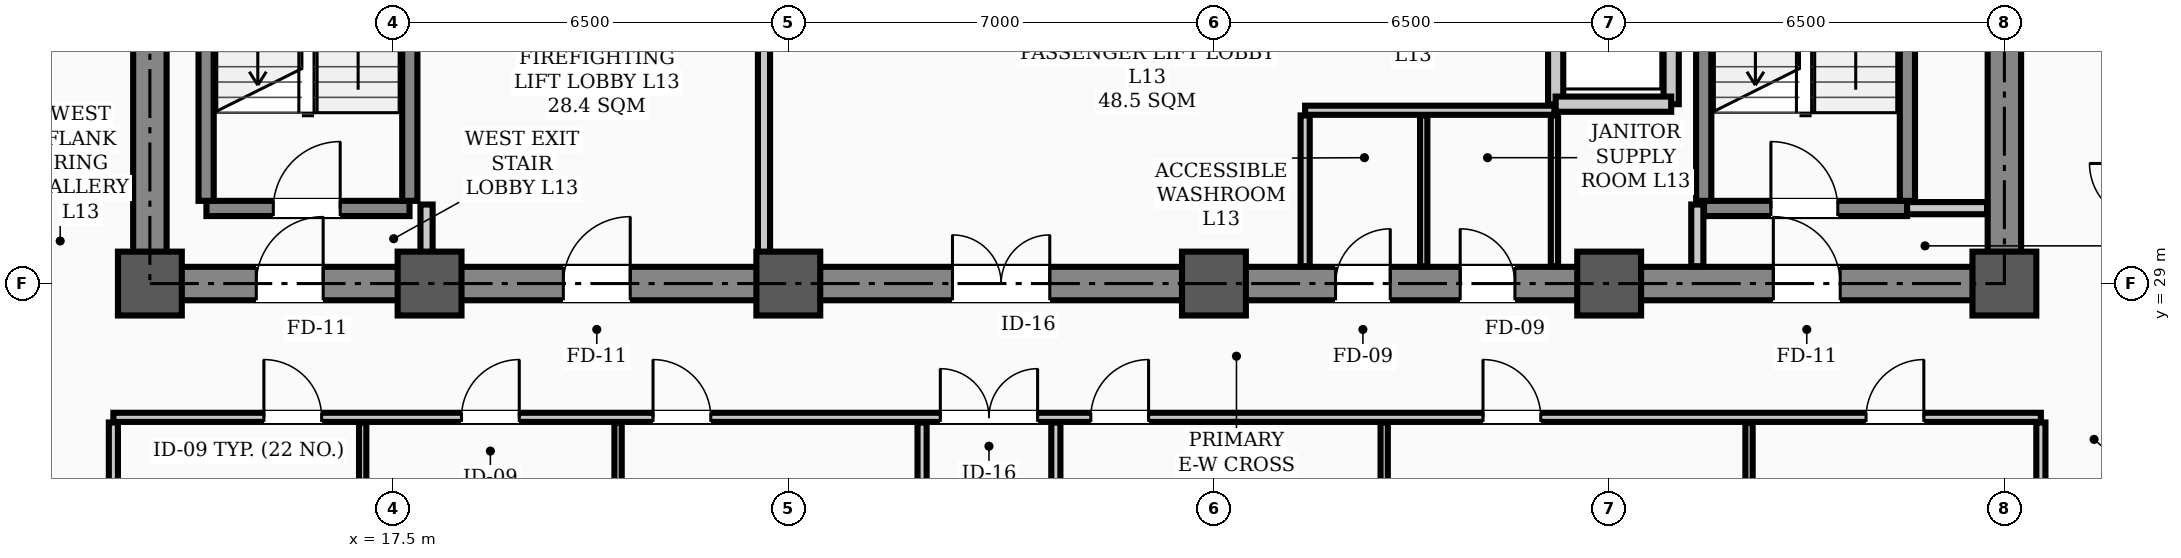
"""IFC4 building model, lengths in metres.
Left out: names, types, materials, properties, quantities, classifications, styles, units other than length and angle.
Written with IfcOpenShell. Run it as: python <this file> out.ifc"""

import sys

from ifc_helpers import new_model, si_unit, direction, frame, frame_2d, origin, origin_2d, place, context, subcontext, project, spatial, rectangle, hollow_rectangle, extrude, element, fill, save


model = new_model("IFC4")
c1 = context("Model", 3, precision=1e-05, world=origin(), true_north=direction((0.0, 1.0)))
c2 = subcontext(c1, "Body", "Model", "MODEL_VIEW")
j1 = project(units=[si_unit("LENGTHUNIT", "METRE"), si_unit("PLANEANGLEUNIT", "RADIAN")], contexts=[c1])
p1 = place(None, origin())
s1 = spatial("IfcSite", under=j1, at=p1, CompositionType="ELEMENT")
p2 = place(p1, origin())
s2 = spatial("IfcBuilding", under=s1, at=p2, CompositionType="ELEMENT")
p3 = place(p2, frame((0.0, 0.0, 53.8)))
s3 = spatial("IfcBuildingStorey", under=s2, at=p3, CompositionType="ELEMENT", Elevation=53.8)
for number, where, z_axis, x_axis in (
    (1, (13.5, 29.0, 0.0), (0.0, 0.0, 1.0), (1.0, 0.0, 0.0)),
    (2, (18.1, 29.0, 0.0), (0.0, 0.0, 1.0), (1.0, 0.0, 0.0)),
    (3, (24.0, 29.0, 0.0), (0.0, 0.0, 1.0), (1.0, 0.0, 0.0)),
    (4, (31.0, 29.0, 0.0), (0.0, 0.0, 1.0), (1.0, 0.0, 0.0)),
    (5, (37.5, 29.0, 0.0), (0.0, 0.0, 1.0), (1.0, 0.0, 0.0)),
    (6, (44.0, 29.0, 0.0), (0.0, 0.0, 1.0), (1.0, 0.0, 0.0)),
):
    element("IfcColumn", number, at=place(p3, frame(where, z_axis=z_axis, x_axis=x_axis)), inside=s3, PredefinedType="COLUMN", context=c2, shape_type="SweptSolid", body=[
        extrude(hollow_rectangle(XDim=1.05, YDim=1.05, WallThickness=0.038, InnerFilletRadius=0.019, OuterFilletRadius=0.057, at=origin_2d()), origin(), (0.0, 0.0, 1.0), 3.9),
    ])
p4 = place(p3, frame((13.5, 29.0, 0.0), z_axis=(0.0, 0.0, 1.0), x_axis=(1.0, 0.0, 0.0)))
e7 = element("IfcWall", 7, at=p4, inside=s3, PredefinedType="SHEAR", context=c2, shape_type="SweptSolid", body=[
    extrude(rectangle(XDim=30.5, YDim=0.55, at=frame_2d((15.25, 0.0))), origin(), (0.0, 0.0, 1.0), 3.72),
])
p5 = place(p4, frame((1.75, 0.0, 0.0)))
e8 = element("IfcOpeningElement", 8, at=p5, cuts=e7, PredefinedType="OPENING", context=c2, shape_type="SweptSolid", body=[
    extrude(rectangle(XDim=1.1, YDim=2.08, at=frame_2d((0.55, 1.04))), frame((0.0, 0.285, 0.0), z_axis=(0.0, -1.0, 0.0), x_axis=(1.0, 0.0, 0.0)), (0.0, 0.0, 1.0), 0.57),
])
p6 = place(p4, frame((26.7, 0.0, 0.0)))
e9 = element("IfcOpeningElement", 9, at=p6, cuts=e7, PredefinedType="OPENING", context=c2, shape_type="SweptSolid", body=[
    extrude(rectangle(XDim=1.1, YDim=2.08, at=frame_2d((0.55, 1.04))), frame((0.0, 0.285, 0.0), z_axis=(0.0, -1.0, 0.0), x_axis=(1.0, 0.0, 0.0)), (0.0, 0.0, 1.0), 0.57),
])
p7 = place(p4, frame((6.8, 0.0, 0.0)))
e10 = element("IfcOpeningElement", 10, at=p7, cuts=e7, PredefinedType="OPENING", context=c2, shape_type="SweptSolid", body=[
    extrude(rectangle(XDim=1.1, YDim=2.08, at=frame_2d((0.55, 1.04))), frame((0.0, 0.285, 0.0), z_axis=(0.0, -1.0, 0.0), x_axis=(1.0, 0.0, 0.0)), (0.0, 0.0, 1.0), 0.57),
])
p8 = place(p4, frame((13.2, 0.0, 0.0)))
e11 = element("IfcOpeningElement", 11, at=p8, cuts=e7, PredefinedType="OPENING", context=c2, shape_type="SweptSolid", body=[
    extrude(rectangle(XDim=1.6, YDim=2.08, at=frame_2d((0.8, 1.04))), frame((0.0, 0.285, 0.0), z_axis=(0.0, -1.0, 0.0), x_axis=(1.0, 0.0, 0.0)), (0.0, 0.0, 1.0), 0.57),
])
p9 = place(p4, frame((19.5, 0.0, 0.0)))
e12 = element("IfcOpeningElement", 12, at=p9, cuts=e7, PredefinedType="OPENING", context=c2, shape_type="SweptSolid", body=[
    extrude(rectangle(XDim=0.9, YDim=2.08, at=frame_2d((0.45, 1.04))), frame((0.0, 0.285, 0.0), z_axis=(0.0, -1.0, 0.0), x_axis=(1.0, 0.0, 0.0)), (0.0, 0.0, 1.0), 0.57),
])
p10 = place(p4, frame((21.55, 0.0, 0.0)))
e13 = element("IfcOpeningElement", 13, at=p10, cuts=e7, PredefinedType="OPENING", context=c2, shape_type="SweptSolid", body=[
    extrude(rectangle(XDim=0.9, YDim=2.08, at=frame_2d((0.45, 1.04))), frame((0.0, 0.285, 0.0), z_axis=(0.0, -1.0, 0.0), x_axis=(1.0, 0.0, 0.0)), (0.0, 0.0, 1.0), 0.57),
])
for number, where, z_axis, x_axis in (
    (14, (13.5, 29.35, 0.0), (0.0, 0.0, 1.0), (0.0, 1.0, 0.0)),
    (15, (44.0, 29.35, 0.0), (0.0, 0.0, 1.0), (0.0, 1.0, 0.0)),
):
    element("IfcWall", number, at=place(p3, frame(where, z_axis=z_axis, x_axis=x_axis)), inside=s3, PredefinedType="SHEAR", context=c2, shape_type="SweptSolid", body=[
        extrude(rectangle(XDim=8.6, YDim=0.55, at=frame_2d((4.3, 0.0))), origin(), (0.0, 0.0, 1.0), 3.72),
    ])
p11 = place(p3, frame((14.43, 30.235, 0.0), z_axis=(0.0, 0.0, 1.0), x_axis=(1.0, 0.0, 0.0)))
e16 = element("IfcWall", 16, at=p11, inside=s3, PredefinedType="STANDARD", context=c2, shape_type="SweptSolid", body=[
    extrude(rectangle(XDim=3.34, YDim=0.25, at=frame_2d((1.67, 0.0))), origin(), (0.0, 0.0, 1.0), 3.72),
])
p12 = place(p11, frame((1.1, 0.0, 0.0)))
e17 = element("IfcOpeningElement", 17, at=p12, cuts=e16, PredefinedType="OPENING", context=c2, shape_type="SweptSolid", body=[
    extrude(rectangle(XDim=1.1, YDim=2.08, at=frame_2d((0.55, 1.04))), frame((0.0, 0.135, 0.0), z_axis=(0.0, -1.0, 0.0), x_axis=(1.0, 0.0, 0.0)), (0.0, 0.0, 1.0), 0.27),
])
for number, where, z_axis, x_axis in (
    (18, (14.425, 30.36, 0.0), (0.0, 0.0, 1.0), (0.0, 1.0, 0.0)),
    (19, (17.775, 30.36, 0.0), (0.0, 0.0, 1.0), (0.0, 1.0, 0.0)),
):
    element("IfcWall", number, at=place(p3, frame(where, z_axis=z_axis, x_axis=x_axis)), inside=s3, PredefinedType="STANDARD", context=c2, shape_type="SweptSolid", body=[
        extrude(rectangle(XDim=7.184, YDim=0.25, at=frame_2d((3.592, 0.0))), origin(), (0.0, 0.0, 1.0), 3.72),
    ])
p13 = place(p3, frame((39.06, 30.235, 0.0), z_axis=(0.0, 0.0, 1.0), x_axis=(1.0, 0.0, 0.0)))
e20 = element("IfcWall", 20, at=p13, inside=s3, PredefinedType="STANDARD", context=c2, shape_type="SweptSolid", body=[
    extrude(rectangle(XDim=3.34, YDim=0.25, at=frame_2d((1.67, 0.0))), origin(), (0.0, 0.0, 1.0), 3.72),
])
p14 = place(p13, frame((1.1, 0.0, 0.0)))
e21 = element("IfcOpeningElement", 21, at=p14, cuts=e20, PredefinedType="OPENING", context=c2, shape_type="SweptSolid", body=[
    extrude(rectangle(XDim=1.1, YDim=2.08, at=frame_2d((0.55, 1.04))), frame((0.0, 0.135, 0.0), z_axis=(0.0, -1.0, 0.0), x_axis=(1.0, 0.0, 0.0)), (0.0, 0.0, 1.0), 0.27),
])
for number, where, z_axis, x_axis in (
    (22, (39.055, 30.36, 0.0), (0.0, 0.0, 1.0), (0.0, 1.0, 0.0)),
    (23, (42.405, 30.36, 0.0), (0.0, 0.0, 1.0), (0.0, 1.0, 0.0)),
):
    element("IfcWall", number, at=place(p3, frame(where, z_axis=z_axis, x_axis=x_axis)), inside=s3, PredefinedType="STANDARD", context=c2, shape_type="SweptSolid", body=[
        extrude(rectangle(XDim=7.184, YDim=0.25, at=frame_2d((3.592, 0.0))), origin(), (0.0, 0.0, 1.0), 3.72),
    ])
p15 = place(p3, frame((36.62, 31.95, 0.0), z_axis=(0.0, 0.0, 1.0), x_axis=(0.0, 1.0, 0.0)))
e24 = element("IfcWall", 24, at=p15, inside=s3, PredefinedType="STANDARD", context=c2, shape_type="SweptSolid", body=[
    extrude(rectangle(XDim=6.0, YDim=0.25, at=frame_2d((3.0, 0.0))), origin(), (0.0, 0.0, 1.0), 3.3),
])
p16 = place(p15, frame((0.9, 0.0, 0.0)))
e25 = element("IfcOpeningElement", 25, at=p16, cuts=e24, PredefinedType="OPENING", context=c2, shape_type="SweptSolid", body=[
    extrude(rectangle(XDim=1.1, YDim=2.08, at=frame_2d((0.55, 1.04))), frame((0.0, 0.135, 0.0), z_axis=(0.0, -1.0, 0.0), x_axis=(1.0, 0.0, 0.0)), (0.0, 0.0, 1.0), 0.27),
])
p17 = place(p15, frame((4.0, 0.0, 0.0)))
e26 = element("IfcOpeningElement", 26, at=p17, cuts=e24, PredefinedType="OPENING", context=c2, shape_type="SweptSolid", body=[
    extrude(rectangle(XDim=1.1, YDim=2.08, at=frame_2d((0.55, 1.04))), frame((0.0, 0.135, 0.0), z_axis=(0.0, -1.0, 0.0), x_axis=(1.0, 0.0, 0.0)), (0.0, 0.0, 1.0), 0.27),
])
p18 = place(p3, frame((38.52, 31.95, 0.0), z_axis=(0.0, 0.0, 1.0), x_axis=(0.0, 1.0, 0.0)))
e27 = element("IfcWall", 27, at=p18, inside=s3, PredefinedType="STANDARD", context=c2, shape_type="SweptSolid", body=[
    extrude(rectangle(XDim=6.0, YDim=0.25, at=frame_2d((3.0, 0.0))), origin(), (0.0, 0.0, 1.0), 3.3),
])
p19 = place(p3, frame((36.62, 31.95, 0.0), z_axis=(0.0, 0.0, 1.0), x_axis=(1.0, 0.0, 0.0)))
e28 = element("IfcWall", 28, at=p19, inside=s3, PredefinedType="STANDARD", context=c2, shape_type="SweptSolid", body=[
    extrude(rectangle(XDim=1.9, YDim=0.25, at=frame_2d((0.95, 0.0))), origin(), (0.0, 0.0, 1.0), 3.48),
])
p20 = place(p3, frame((42.4, 30.24, 0.0), z_axis=(0.0, 0.0, 1.0), x_axis=(1.0, 0.0, 0.0)))
e29 = element("IfcWall", 29, at=p20, inside=s3, PredefinedType="STANDARD", context=c2, shape_type="SweptSolid", body=[
    extrude(rectangle(XDim=1.315, YDim=0.2, at=frame_2d((0.658, 0.0))), origin(), (0.0, 0.0, 1.0), 3.1),
])
p21 = place(p3, frame((32.5, 31.85, 0.0), z_axis=(0.0, 0.0, 1.0), x_axis=(1.0, 0.0, 0.0)))
e30 = element("IfcWall", 30, at=p21, inside=s3, PredefinedType="PARTITIONING", context=c2, shape_type="SweptSolid", body=[
    extrude(rectangle(XDim=4.1, YDim=0.15, at=frame_2d((2.05, 0.0))), origin(), (0.0, 0.0, 1.0), 3.72),
])
p22 = place(p3, frame((12.9, 26.8, 0.0), z_axis=(0.0, 0.0, 1.0), x_axis=(1.0, 0.0, 0.0)))
e31 = element("IfcWall", 31, at=p22, inside=s3, PredefinedType="PARTITIONING", context=c2, shape_type="SweptSolid", body=[
    extrude(rectangle(XDim=31.7, YDim=0.15, at=frame_2d((15.85, 0.0))), origin(), (0.0, 0.0, 1.0), 3.1),
])
p23 = place(p22, frame((13.6, 0.0, 0.0)))
e32 = element("IfcOpeningElement", 32, at=p23, cuts=e31, PredefinedType="OPENING", context=c2, shape_type="SweptSolid", body=[
    extrude(rectangle(XDim=1.6, YDim=2.08, at=frame_2d((0.8, 1.04))), frame((0.0, 0.085, 0.0), z_axis=(0.0, -1.0, 0.0), x_axis=(1.0, 0.0, 0.0)), (0.0, 0.0, 1.0), 0.17),
])
p24 = place(p22, frame((2.475, 0.0, 0.0)))
e33 = element("IfcOpeningElement", 33, at=p24, cuts=e31, PredefinedType="OPENING", context=c2, shape_type="SweptSolid", body=[
    extrude(rectangle(XDim=0.95, YDim=2.08, at=frame_2d((0.475, 1.04))), frame((0.0, 0.085, 0.0), z_axis=(0.0, -1.0, 0.0), x_axis=(1.0, 0.0, 0.0)), (0.0, 0.0, 1.0), 0.17),
])
p25 = place(p22, frame((5.725, 0.0, 0.0)))
e34 = element("IfcOpeningElement", 34, at=p25, cuts=e31, PredefinedType="OPENING", context=c2, shape_type="SweptSolid", body=[
    extrude(rectangle(XDim=0.95, YDim=2.08, at=frame_2d((0.475, 1.04))), frame((0.0, 0.085, 0.0), z_axis=(0.0, -1.0, 0.0), x_axis=(1.0, 0.0, 0.0)), (0.0, 0.0, 1.0), 0.17),
])
p26 = place(p22, frame((8.875, 0.0, 0.0)))
e35 = element("IfcOpeningElement", 35, at=p26, cuts=e31, PredefinedType="OPENING", context=c2, shape_type="SweptSolid", body=[
    extrude(rectangle(XDim=0.95, YDim=2.08, at=frame_2d((0.475, 1.04))), frame((0.0, 0.085, 0.0), z_axis=(0.0, -1.0, 0.0), x_axis=(1.0, 0.0, 0.0)), (0.0, 0.0, 1.0), 0.17),
])
p27 = place(p22, frame((16.075, 0.0, 0.0)))
e36 = element("IfcOpeningElement", 36, at=p27, cuts=e31, PredefinedType="OPENING", context=c2, shape_type="SweptSolid", body=[
    extrude(rectangle(XDim=0.95, YDim=2.08, at=frame_2d((0.475, 1.04))), frame((0.0, 0.085, 0.0), z_axis=(0.0, -1.0, 0.0), x_axis=(1.0, 0.0, 0.0)), (0.0, 0.0, 1.0), 0.17),
])
p28 = place(p22, frame((22.525, 0.0, 0.0)))
e37 = element("IfcOpeningElement", 37, at=p28, cuts=e31, PredefinedType="OPENING", context=c2, shape_type="SweptSolid", body=[
    extrude(rectangle(XDim=0.95, YDim=2.08, at=frame_2d((0.475, 1.04))), frame((0.0, 0.085, 0.0), z_axis=(0.0, -1.0, 0.0), x_axis=(1.0, 0.0, 0.0)), (0.0, 0.0, 1.0), 0.17),
])
p29 = place(p22, frame((28.825, 0.0, 0.0)))
e38 = element("IfcOpeningElement", 38, at=p29, cuts=e31, PredefinedType="OPENING", context=c2, shape_type="SweptSolid", body=[
    extrude(rectangle(XDim=0.95, YDim=2.08, at=frame_2d((0.475, 1.04))), frame((0.0, 0.085, 0.0), z_axis=(0.0, -1.0, 0.0), x_axis=(1.0, 0.0, 0.0)), (0.0, 0.0, 1.0), 0.17),
])
for number, where, z_axis, x_axis in (
    (39, (18.05, 29.285, 0.0), (0.0, 0.0, 1.0), (0.0, 1.0, 0.0)),
    (40, (38.95, 29.285, 0.0), (0.0, 0.0, 1.0), (0.0, 1.0, 0.0)),
):
    element("IfcWall", number, at=place(p3, frame(where, z_axis=z_axis, x_axis=x_axis)), inside=s3, PredefinedType="STANDARD", context=c2, shape_type="SweptSolid", body=[
        extrude(rectangle(XDim=1.015, YDim=0.2, at=frame_2d((0.508, 0.0))), origin(), (0.0, 0.0, 1.0), 3.3),
    ])
p30 = place(p3, frame((23.6, 29.285, 0.0), z_axis=(0.0, 0.0, 1.0), x_axis=(0.0, 1.0, 0.0)))
e41 = element("IfcWall", 41, at=p30, inside=s3, PredefinedType="STANDARD", context=c2, shape_type="SweptSolid", body=[
    extrude(rectangle(XDim=5.415, YDim=0.2, at=frame_2d((2.708, 0.0))), origin(), (0.0, 0.0, 1.0), 3.1),
])
p31 = place(p3, frame((32.5, 29.285, 0.0), z_axis=(0.0, 0.0, 1.0), x_axis=(0.0, 1.0, 0.0)))
e42 = element("IfcWall", 42, at=p31, inside=s3, PredefinedType="PARTITIONING", context=c2, shape_type="SweptSolid", body=[
    extrude(rectangle(XDim=2.48, YDim=0.15, at=frame_2d((1.24, 0.0))), origin(), (0.0, 0.0, 1.0), 3.3),
])
for number, where, z_axis, x_axis in (
    (43, (36.6, 29.285, 0.0), (0.0, 0.0, 1.0), (0.0, 1.0, 0.0)),
    (44, (34.45, 29.285, 0.0), (0.0, 0.0, 1.0), (0.0, 1.0, 0.0)),
):
    element("IfcWall", number, at=place(p3, frame(where, z_axis=z_axis, x_axis=x_axis)), inside=s3, PredefinedType="PARTITIONING", context=c2, shape_type="SweptSolid", body=[
        extrude(rectangle(XDim=2.48, YDim=0.12, at=frame_2d((1.24, 0.0))), origin(), (0.0, 0.0, 1.0), 3.3),
    ])
for number, where, z_axis, x_axis in (
    (45, (26.2, 19.335, 0.0), (0.0, 0.0, 1.0), (0.0, 1.0, 0.0)),
    (46, (28.4, 19.335, 0.0), (0.0, 0.0, 1.0), (0.0, 1.0, 0.0)),
    (47, (12.9, 19.335, 0.0), (0.0, 0.0, 1.0), (0.0, 1.0, 0.0)),
    (48, (44.6, 19.335, 0.0), (0.0, 0.0, 1.0), (0.0, 1.0, 0.0)),
):
    element("IfcWall", number, at=place(p3, frame(where, z_axis=z_axis, x_axis=x_axis)), inside=s3, PredefinedType="PARTITIONING", context=c2, shape_type="SweptSolid", body=[
        extrude(rectangle(XDim=7.38, YDim=0.15, at=frame_2d((3.69, 0.0))), origin(), (0.0, 0.0, 1.0), 3.0),
    ])
for number, where, z_axis, x_axis in (
    (49, (17.0, 19.335, 0.0), (0.0, 0.0, 1.0), (0.0, 1.0, 0.0)),
    (50, (21.2, 19.335, 0.0), (0.0, 0.0, 1.0), (0.0, 1.0, 0.0)),
    (51, (33.8, 19.335, 0.0), (0.0, 0.0, 1.0), (0.0, 1.0, 0.0)),
    (52, (39.8, 19.335, 0.0), (0.0, 0.0, 1.0), (0.0, 1.0, 0.0)),
):
    element("IfcWall", number, at=place(p3, frame(where, z_axis=z_axis, x_axis=x_axis)), inside=s3, PredefinedType="PARTITIONING", context=c2, shape_type="SweptSolid", body=[
        extrude(rectangle(XDim=7.38, YDim=0.12, at=frame_2d((3.69, 0.0))), origin(), (0.0, 0.0, 1.0), 3.0),
    ])
p32 = place(p12, origin())
e53 = element("IfcDoor", 53, at=p32, inside=s3, OperationType="SINGLE_SWING_RIGHT", PredefinedType="DOOR", context=c2, shape_type="SweptSolid", body=[
    extrude(rectangle(XDim=1.1, YDim=2.08, at=frame_2d((0.55, 1.04))), frame((0.0, 0.025, 0.0), z_axis=(0.0, -1.0, 0.0), x_axis=(1.0, 0.0, 0.0)), (0.0, 0.0, 1.0), 0.05),
])
fill(e17, e53)
p33 = place(p14, origin())
e54 = element("IfcDoor", 54, at=p33, inside=s3, OperationType="SINGLE_SWING_LEFT", PredefinedType="DOOR", context=c2, shape_type="SweptSolid", body=[
    extrude(rectangle(XDim=1.1, YDim=2.08, at=frame_2d((0.55, 1.04))), frame((0.0, 0.025, 0.0), z_axis=(0.0, -1.0, 0.0), x_axis=(1.0, 0.0, 0.0)), (0.0, 0.0, 1.0), 0.05),
])
fill(e21, e54)
p34 = place(p5, origin())
e55 = element("IfcDoor", 55, at=p34, inside=s3, OperationType="SINGLE_SWING_RIGHT", PredefinedType="DOOR", context=c2, shape_type="SweptSolid", body=[
    extrude(rectangle(XDim=1.1, YDim=2.08, at=frame_2d((0.55, 1.04))), frame((0.0, 0.025, 0.0), z_axis=(0.0, -1.0, 0.0), x_axis=(1.0, 0.0, 0.0)), (0.0, 0.0, 1.0), 0.05),
])
fill(e8, e55)
p35 = place(p6, origin())
e56 = element("IfcDoor", 56, at=p35, inside=s3, OperationType="SINGLE_SWING_LEFT", PredefinedType="DOOR", context=c2, shape_type="SweptSolid", body=[
    extrude(rectangle(XDim=1.1, YDim=2.08, at=frame_2d((0.55, 1.04))), frame((0.0, 0.025, 0.0), z_axis=(0.0, -1.0, 0.0), x_axis=(1.0, 0.0, 0.0)), (0.0, 0.0, 1.0), 0.05),
])
fill(e9, e56)
p36 = place(p7, origin())
e57 = element("IfcDoor", 57, at=p36, inside=s3, OperationType="SINGLE_SWING_RIGHT", PredefinedType="DOOR", context=c2, shape_type="SweptSolid", body=[
    extrude(rectangle(XDim=1.1, YDim=2.08, at=frame_2d((0.55, 1.04))), frame((0.0, 0.025, 0.0), z_axis=(0.0, -1.0, 0.0), x_axis=(1.0, 0.0, 0.0)), (0.0, 0.0, 1.0), 0.05),
])
fill(e10, e57)
p37 = place(p8, origin())
e58 = element("IfcDoor", 58, at=p37, inside=s3, OperationType="DOUBLE_DOOR_SINGLE_SWING", PredefinedType="DOOR", context=c2, shape_type="SweptSolid", body=[
    extrude(rectangle(XDim=1.6, YDim=2.08, at=frame_2d((0.8, 1.04))), frame((0.0, 0.025, 0.0), z_axis=(0.0, -1.0, 0.0), x_axis=(1.0, 0.0, 0.0)), (0.0, 0.0, 1.0), 0.05),
])
fill(e11, e58)
p38 = place(p9, origin())
e59 = element("IfcDoor", 59, at=p38, inside=s3, OperationType="SINGLE_SWING_RIGHT", PredefinedType="DOOR", context=c2, shape_type="SweptSolid", body=[
    extrude(rectangle(XDim=0.9, YDim=2.08, at=frame_2d((0.45, 1.04))), frame((0.0, 0.025, 0.0), z_axis=(0.0, -1.0, 0.0), x_axis=(1.0, 0.0, 0.0)), (0.0, 0.0, 1.0), 0.05),
])
fill(e12, e59)
p39 = place(p10, origin())
e60 = element("IfcDoor", 60, at=p39, inside=s3, OperationType="SINGLE_SWING_LEFT", PredefinedType="DOOR", context=c2, shape_type="SweptSolid", body=[
    extrude(rectangle(XDim=0.9, YDim=2.08, at=frame_2d((0.45, 1.04))), frame((0.0, 0.025, 0.0), z_axis=(0.0, -1.0, 0.0), x_axis=(1.0, 0.0, 0.0)), (0.0, 0.0, 1.0), 0.05),
])
fill(e13, e60)
p40 = place(p23, origin())
e61 = element("IfcDoor", 61, at=p40, inside=s3, OperationType="DOUBLE_DOOR_SINGLE_SWING", PredefinedType="DOOR", context=c2, shape_type="SweptSolid", body=[
    extrude(rectangle(XDim=1.6, YDim=2.08, at=frame_2d((0.8, 1.04))), frame((0.0, 0.025, 0.0), z_axis=(0.0, -1.0, 0.0), x_axis=(1.0, 0.0, 0.0)), (0.0, 0.0, 1.0), 0.05),
])
fill(e32, e61)
p41 = place(p24, origin())
e62 = element("IfcDoor", 62, at=p41, inside=s3, OperationType="SINGLE_SWING_LEFT", PredefinedType="DOOR", context=c2, shape_type="SweptSolid", body=[
    extrude(rectangle(XDim=0.95, YDim=2.08, at=frame_2d((0.475, 1.04))), frame((0.0, 0.025, 0.0), z_axis=(0.0, -1.0, 0.0), x_axis=(1.0, 0.0, 0.0)), (0.0, 0.0, 1.0), 0.05),
])
fill(e33, e62)
p42 = place(p25, origin())
e63 = element("IfcDoor", 63, at=p42, inside=s3, OperationType="SINGLE_SWING_RIGHT", PredefinedType="DOOR", context=c2, shape_type="SweptSolid", body=[
    extrude(rectangle(XDim=0.95, YDim=2.08, at=frame_2d((0.475, 1.04))), frame((0.0, 0.025, 0.0), z_axis=(0.0, -1.0, 0.0), x_axis=(1.0, 0.0, 0.0)), (0.0, 0.0, 1.0), 0.05),
])
fill(e34, e63)
p43 = place(p26, origin())
e64 = element("IfcDoor", 64, at=p43, inside=s3, OperationType="SINGLE_SWING_LEFT", PredefinedType="DOOR", context=c2, shape_type="SweptSolid", body=[
    extrude(rectangle(XDim=0.95, YDim=2.08, at=frame_2d((0.475, 1.04))), frame((0.0, 0.025, 0.0), z_axis=(0.0, -1.0, 0.0), x_axis=(1.0, 0.0, 0.0)), (0.0, 0.0, 1.0), 0.05),
])
fill(e35, e64)
p44 = place(p27, origin())
e65 = element("IfcDoor", 65, at=p44, inside=s3, OperationType="SINGLE_SWING_RIGHT", PredefinedType="DOOR", context=c2, shape_type="SweptSolid", body=[
    extrude(rectangle(XDim=0.95, YDim=2.08, at=frame_2d((0.475, 1.04))), frame((0.0, 0.025, 0.0), z_axis=(0.0, -1.0, 0.0), x_axis=(1.0, 0.0, 0.0)), (0.0, 0.0, 1.0), 0.05),
])
fill(e36, e65)
p45 = place(p28, origin())
e66 = element("IfcDoor", 66, at=p45, inside=s3, OperationType="SINGLE_SWING_LEFT", PredefinedType="DOOR", context=c2, shape_type="SweptSolid", body=[
    extrude(rectangle(XDim=0.95, YDim=2.08, at=frame_2d((0.475, 1.04))), frame((0.0, 0.025, 0.0), z_axis=(0.0, -1.0, 0.0), x_axis=(1.0, 0.0, 0.0)), (0.0, 0.0, 1.0), 0.05),
])
fill(e37, e66)
p46 = place(p29, origin())
e67 = element("IfcDoor", 67, at=p46, inside=s3, OperationType="SINGLE_SWING_RIGHT", PredefinedType="DOOR", context=c2, shape_type="SweptSolid", body=[
    extrude(rectangle(XDim=0.95, YDim=2.08, at=frame_2d((0.475, 1.04))), frame((0.0, 0.025, 0.0), z_axis=(0.0, -1.0, 0.0), x_axis=(1.0, 0.0, 0.0)), (0.0, 0.0, 1.0), 0.05),
])
fill(e38, e67)
save(model, sys.argv[1])
